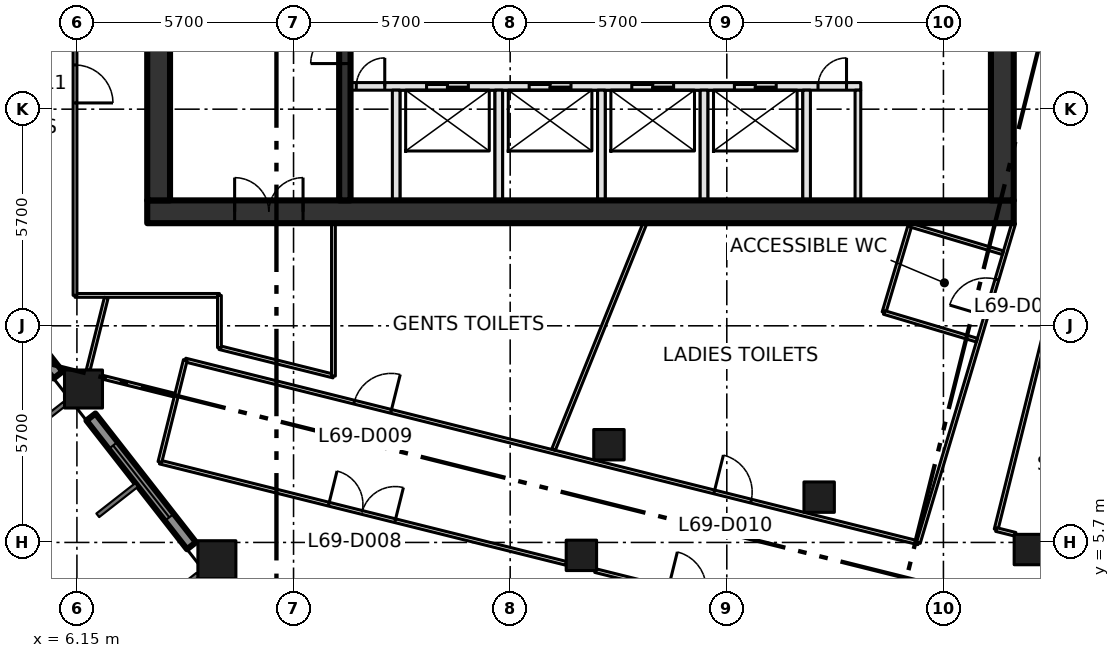
"""IFC4 building model, lengths in metres.
Left out: names, types, materials, properties, quantities, classifications, styles, units other than length and angle.
Written with IfcOpenShell. Run it as: python <this file> out.ifc"""

import sys

from ifc_helpers import new_model, si_unit, direction, frame, frame_2d, origin, origin_2d, place, context, subcontext, project, spatial, rectangle, extrude, element, fill, save


model = new_model("IFC4")
c1 = context("Model", 3, precision=1e-05, world=origin(), true_north=direction((0.0, 1.0)))
c2 = subcontext(c1, "Body", "Model", "MODEL_VIEW")
j1 = project(units=[si_unit("LENGTHUNIT", "METRE"), si_unit("PLANEANGLEUNIT", "RADIAN")], contexts=[c1])
p1 = place(None, origin())
s1 = spatial("IfcSite", under=j1, at=p1, CompositionType="ELEMENT")
p2 = place(p1, origin())
s2 = spatial("IfcBuilding", under=s1, at=p2, CompositionType="ELEMENT")
p3 = place(p2, frame((0.0, 0.0, 302.4)))
s3 = spatial("IfcBuildingStorey", under=s2, at=p3, CompositionType="ELEMENT", Elevation=302.4)
for number, where, z_axis, x_axis in (
    (1, (9.833, 5.245, 0.0), (0.0, 0.0, 1.0), (1.0, 0.0, 0.0)),
    (2, (6.323, 9.737, 0.0), (0.0, 0.0, 1.0), (1.0, 0.0, 0.0)),
):
    element("IfcColumn", number, at=place(p3, frame(where, z_axis=z_axis, x_axis=x_axis)), inside=s3, PredefinedType="COLUMN", context=c2, shape_type="SweptSolid", body=[
        extrude(rectangle(XDim=1.0, YDim=1.0, at=origin_2d()), origin(), (0.0, 0.0, 1.0), 4.2),
    ])
for number, where, z_axis, x_axis in (
    (3, (19.424, 5.36, 0.0), (0.0, 0.0, 1.0), (1.0, 0.0, 0.0)),
    (4, (20.149, 8.271, 0.0), (0.0, 0.0, 1.0), (1.0, 0.0, 0.0)),
    (5, (25.68, 6.892, 0.0), (0.0, 0.0, 1.0), (1.0, 0.0, 0.0)),
    (6, (31.211, 5.513, 0.0), (0.0, 0.0, 1.0), (1.0, 0.0, 0.0)),
):
    element("IfcColumn", number, at=place(p3, frame(where, z_axis=z_axis, x_axis=x_axis)), inside=s3, PredefinedType="COLUMN", context=c2, shape_type="SweptSolid", body=[
        extrude(rectangle(XDim=0.8, YDim=0.8, at=origin_2d()), origin(), (0.0, 0.0, 1.0), 4.2),
    ])
p4 = place(p3, frame((8.0, 14.4, -0.3), z_axis=(0.0, 0.0, 1.0), x_axis=(1.0, 0.0, 0.0)))
e7 = element("IfcWall", 7, at=p4, inside=s3, PredefinedType="SHEAR", context=c2, shape_type="SweptSolid", body=[
    extrude(rectangle(XDim=22.8, YDim=0.6, at=frame_2d((11.4, 0.0))), origin(), (0.0, 0.0, 1.0), 4.2),
])
p5 = place(p4, frame((2.3, 0.0, 0.3)))
e8 = element("IfcOpeningElement", 8, at=p5, cuts=e7, PredefinedType="OPENING", context=c2, shape_type="SweptSolid", body=[
    extrude(rectangle(XDim=1.8, YDim=2.1, at=frame_2d((0.9, 1.05))), frame((0.0, 0.31, 0.0), z_axis=(0.0, -1.0, 0.0), x_axis=(1.0, 0.0, 0.0)), (0.0, 0.0, 1.0), 0.62),
])
for number, where, z_axis, x_axis in (
    (9, (8.3, 14.7, -0.3), (0.0, 0.0, 1.0), (0.0, 1.0, 0.0)),
    (10, (30.5, 14.7, -0.3), (0.0, 0.0, 1.0), (0.0, 1.0, 0.0)),
):
    element("IfcWall", number, at=place(p3, frame(where, z_axis=z_axis, x_axis=x_axis)), inside=s3, PredefinedType="SHEAR", context=c2, shape_type="SweptSolid", body=[
        extrude(rectangle(XDim=21.0, YDim=0.6, at=frame_2d((10.5, 0.0))), origin(), (0.0, 0.0, 1.0), 4.2),
    ])
p6 = place(p3, frame((13.35, 17.7, 0.0), z_axis=(0.0, 0.0, 1.0), x_axis=(1.0, 0.0, 0.0)))
e11 = element("IfcWall", 11, at=p6, inside=s3, PredefinedType="SOLIDWALL", context=c2, shape_type="SweptSolid", body=[
    extrude(rectangle(XDim=13.425, YDim=0.2, at=frame_2d((6.712, 0.0))), origin(), (0.0, 0.0, 1.0), 3.9),
])
p7 = place(p6, frame((2.0, 0.0, 0.0)))
e12 = element("IfcOpeningElement", 12, at=p7, cuts=e11, PredefinedType="OPENING", context=c2, shape_type="SweptSolid", body=[
    extrude(rectangle(XDim=1.1, YDim=2.1, at=frame_2d((0.55, 1.05))), frame((0.0, 0.11, 0.0), z_axis=(0.0, -1.0, 0.0), x_axis=(1.0, 0.0, 0.0)), (0.0, 0.0, 1.0), 0.22),
])
p8 = place(p6, frame((4.7, 0.0, 0.0)))
e13 = element("IfcOpeningElement", 13, at=p8, cuts=e11, PredefinedType="OPENING", context=c2, shape_type="SweptSolid", body=[
    extrude(rectangle(XDim=1.1, YDim=2.1, at=frame_2d((0.55, 1.05))), frame((0.0, 0.11, 0.0), z_axis=(0.0, -1.0, 0.0), x_axis=(1.0, 0.0, 0.0)), (0.0, 0.0, 1.0), 0.22),
])
p9 = place(p6, frame((7.4, 0.0, 0.0)))
e14 = element("IfcOpeningElement", 14, at=p9, cuts=e11, PredefinedType="OPENING", context=c2, shape_type="SweptSolid", body=[
    extrude(rectangle(XDim=1.1, YDim=2.1, at=frame_2d((0.55, 1.05))), frame((0.0, 0.11, 0.0), z_axis=(0.0, -1.0, 0.0), x_axis=(1.0, 0.0, 0.0)), (0.0, 0.0, 1.0), 0.22),
])
p10 = place(p6, frame((10.1, 0.0, 0.0)))
e15 = element("IfcOpeningElement", 15, at=p10, cuts=e11, PredefinedType="OPENING", context=c2, shape_type="SweptSolid", body=[
    extrude(rectangle(XDim=1.1, YDim=2.1, at=frame_2d((0.55, 1.05))), frame((0.0, 0.11, 0.0), z_axis=(0.0, -1.0, 0.0), x_axis=(1.0, 0.0, 0.0)), (0.0, 0.0, 1.0), 0.22),
])
p11 = place(p6, frame((0.15, 0.0, 0.0)))
e16 = element("IfcOpeningElement", 16, at=p11, cuts=e11, PredefinedType="OPENING", context=c2, shape_type="SweptSolid", body=[
    extrude(rectangle(XDim=0.75, YDim=2.1, at=frame_2d((0.375, 1.05))), frame((0.0, 0.11, 0.0), z_axis=(0.0, -1.0, 0.0), x_axis=(1.0, 0.0, 0.0)), (0.0, 0.0, 1.0), 0.22),
])
p12 = place(p6, frame((12.3, 0.0, 0.0)))
e17 = element("IfcOpeningElement", 17, at=p12, cuts=e11, PredefinedType="OPENING", context=c2, shape_type="SweptSolid", body=[
    extrude(rectangle(XDim=0.75, YDim=2.1, at=frame_2d((0.375, 1.05))), frame((0.0, 0.11, 0.0), z_axis=(0.0, -1.0, 0.0), x_axis=(1.0, 0.0, 0.0)), (0.0, 0.0, 1.0), 0.22),
])
p13 = place(p3, frame((13.2, 14.7, 0.0), z_axis=(0.0, 0.0, 1.0), x_axis=(0.0, 1.0, 0.0)))
e18 = element("IfcWall", 18, at=p13, inside=s3, PredefinedType="SHEAR", context=c2, shape_type="SweptSolid", body=[
    extrude(rectangle(XDim=21.0, YDim=0.3, at=frame_2d((10.5, 0.0))), origin(), (0.0, 0.0, 1.0), 3.9),
])
p14 = place(p13, frame((3.6, 0.0, 0.0)))
e19 = element("IfcOpeningElement", 19, at=p14, cuts=e18, PredefinedType="OPENING", context=c2, shape_type="SweptSolid", body=[
    extrude(rectangle(XDim=1.8, YDim=2.1, at=frame_2d((0.9, 1.05))), frame((0.0, 0.16, 0.0), z_axis=(0.0, -1.0, 0.0), x_axis=(1.0, 0.0, 0.0)), (0.0, 0.0, 1.0), 0.32),
])
p15 = place(p13, frame((11.7, 0.0, 0.0)))
e20 = element("IfcOpeningElement", 20, at=p15, cuts=e18, PredefinedType="OPENING", context=c2, shape_type="SweptSolid", body=[
    extrude(rectangle(XDim=1.2, YDim=2.1, at=frame_2d((0.6, 1.05))), frame((0.0, 0.16, 0.0), z_axis=(0.0, -1.0, 0.0), x_axis=(1.0, 0.0, 0.0)), (0.0, 0.0, 1.0), 0.32),
])
for number, where, z_axis, x_axis in (
    (21, (14.55, 14.7, 0.0), (0.0, 0.0, 1.0), (0.0, 1.0, 0.0)),
    (22, (17.25, 14.7, 0.0), (0.0, 0.0, 1.0), (0.0, 1.0, 0.0)),
    (23, (19.95, 14.7, 0.0), (0.0, 0.0, 1.0), (0.0, 1.0, 0.0)),
    (24, (22.65, 14.7, 0.0), (0.0, 0.0, 1.0), (0.0, 1.0, 0.0)),
    (25, (25.35, 14.7, 0.0), (0.0, 0.0, 1.0), (0.0, 1.0, 0.0)),
):
    element("IfcWall", number, at=place(p3, frame(where, z_axis=z_axis, x_axis=x_axis)), inside=s3, PredefinedType="SOLIDWALL", context=c2, shape_type="SweptSolid", body=[
        extrude(rectangle(XDim=2.9, YDim=0.2, at=frame_2d((1.45, 0.0))), origin(), (0.0, 0.0, 1.0), 3.9),
    ])
p16 = place(p3, frame((26.7, 14.7, 0.0), z_axis=(0.0, 0.0, 1.0), x_axis=(0.0, 1.0, 0.0)))
e26 = element("IfcWall", 26, at=p16, inside=s3, PredefinedType="PARTITIONING", context=c2, shape_type="SweptSolid", body=[
    extrude(rectangle(XDim=2.9, YDim=0.15, at=frame_2d((1.45, 0.0))), origin(), (0.0, 0.0, 1.0), 3.9),
])
p17 = place(p3, frame((3.01, 13.491, 0.0), z_axis=(0.0, 0.0, 1.0), x_axis=(0.615713519567, -0.787970089421, 0.0)))
e27 = element("IfcWall", 27, at=p17, inside=s3, PredefinedType="SOLIDWALL", context=c2, shape_type="SweptSolid", body=[
    extrude(rectangle(XDim=4.296, YDim=0.3, at=frame_2d((2.148, 0.0))), origin(), (0.0, 0.0, 1.0), 3.2),
])
p18 = place(p17, frame((0.948, 0.0, 0.8)))
e28 = element("IfcOpeningElement", 28, at=p18, cuts=e27, PredefinedType="OPENING", context=c2, shape_type="SweptSolid", body=[
    extrude(rectangle(XDim=2.4, YDim=2.1, at=frame_2d((1.2, 1.05))), frame((0.0, 0.16, 0.0), z_axis=(0.0, -1.0, 0.0), x_axis=(1.0, 0.0, 0.0)), (0.0, 0.0, 1.0), 0.32),
])
p19 = place(p3, frame((6.519, 9.0, 0.0), z_axis=(0.0, 0.0, 1.0), x_axis=(0.615634121154, -0.788032124263, 0.0)))
e29 = element("IfcWall", 29, at=p19, inside=s3, PredefinedType="SOLIDWALL", context=c2, shape_type="SweptSolid", body=[
    extrude(rectangle(XDim=4.298, YDim=0.3, at=frame_2d((2.149, 0.0))), origin(), (0.0, 0.0, 1.0), 3.2),
])
p20 = place(p19, frame((0.949, 0.0, 0.8)))
e30 = element("IfcOpeningElement", 30, at=p20, cuts=e29, PredefinedType="OPENING", context=c2, shape_type="SweptSolid", body=[
    extrude(rectangle(XDim=2.4, YDim=2.1, at=frame_2d((1.2, 1.05))), frame((0.0, 0.16, 0.0), z_axis=(0.0, -1.0, 0.0), x_axis=(1.0, 0.0, 0.0)), (0.0, 0.0, 1.0), 0.32),
])
p21 = place(p3, frame((6.1, 12.2, 0.0), z_axis=(0.0, 0.0, 1.0), x_axis=(1.0, 0.0, 0.0)))
e31 = element("IfcWall", 31, at=p21, inside=s3, PredefinedType="PARTITIONING", context=c2, shape_type="SweptSolid", body=[
    extrude(rectangle(XDim=3.8, YDim=0.1, at=frame_2d((1.9, 0.0))), origin(), (0.0, 0.0, 1.0), 3.9),
])
p22 = place(p3, frame((6.1, 38.9, 0.0), z_axis=(0.0, 0.0, 1.0), x_axis=(0.0, -1.0, 0.0)))
e32 = element("IfcWall", 32, at=p22, inside=s3, PredefinedType="PARTITIONING", context=c2, shape_type="SweptSolid", body=[
    extrude(rectangle(XDim=26.7, YDim=0.1, at=frame_2d((13.35, 0.0))), origin(), (0.0, 0.0, 1.0), 3.9),
])
p23 = place(p22, frame((20.636, 0.0, 0.0)))
e33 = element("IfcOpeningElement", 33, at=p23, cuts=e32, PredefinedType="OPENING", context=c2, shape_type="SweptSolid", body=[
    extrude(rectangle(XDim=1.0, YDim=2.1, at=frame_2d((0.5, 1.05))), frame((0.0, 0.06, 0.0), z_axis=(0.0, -1.0, 0.0), x_axis=(1.0, 0.0, 0.0)), (0.0, 0.0, 1.0), 0.12),
])
p24 = place(p22, frame((6.88, 0.0, 0.0)))
e34 = element("IfcOpeningElement", 34, at=p24, cuts=e32, PredefinedType="OPENING", context=c2, shape_type="SweptSolid", body=[
    extrude(rectangle(XDim=1.8, YDim=2.1, at=frame_2d((0.9, 1.05))), frame((0.0, 0.06, 0.0), z_axis=(0.0, -1.0, 0.0), x_axis=(1.0, 0.0, 0.0)), (0.0, 0.0, 1.0), 0.12),
])
p25 = place(p3, frame((8.333, 7.815, 0.0), z_axis=(0.0, 0.0, 1.0), x_axis=(0.970306508913, -0.241878644697, 0.0)))
e35 = element("IfcWall", 35, at=p25, inside=s3, PredefinedType="PARTITIONING", context=c2, shape_type="SweptSolid", body=[
    extrude(rectangle(XDim=11.018, YDim=0.1, at=frame_2d((5.509, 0.0))), origin(), (0.0, 0.0, 1.0), 3.9),
])
p26 = place(p25, frame((4.58, 0.0, 0.0)))
e36 = element("IfcOpeningElement", 36, at=p26, cuts=e35, PredefinedType="OPENING", context=c2, shape_type="SweptSolid", body=[
    extrude(rectangle(XDim=1.8, YDim=2.1, at=frame_2d((0.9, 1.05))), frame((0.0, 0.06, 0.0), z_axis=(0.0, -1.0, 0.0), x_axis=(1.0, 0.0, 0.0)), (0.0, 0.0, 1.0), 0.12),
])
p27 = place(p3, frame((9.002, 10.499, 0.0), z_axis=(0.0, 0.0, 1.0), x_axis=(0.970298340477, -0.241911410372, 0.0)))
e37 = element("IfcWall", 37, at=p27, inside=s3, PredefinedType="PARTITIONING", context=c2, shape_type="SweptSolid", body=[
    extrude(rectangle(XDim=19.88, YDim=0.1, at=frame_2d((9.94, 0.0))), origin(), (0.0, 0.0, 1.0), 3.9),
])
p28 = place(p27, frame((4.58, 0.0, 0.0)))
e38 = element("IfcOpeningElement", 38, at=p28, cuts=e37, PredefinedType="OPENING", context=c2, shape_type="SweptSolid", body=[
    extrude(rectangle(XDim=1.0, YDim=2.1, at=frame_2d((0.5, 1.05))), frame((0.0, 0.06, 0.0), z_axis=(0.0, -1.0, 0.0), x_axis=(1.0, 0.0, 0.0)), (0.0, 0.0, 1.0), 0.12),
])
p29 = place(p27, frame((14.343, 0.0, 0.0)))
e39 = element("IfcOpeningElement", 39, at=p29, cuts=e37, PredefinedType="OPENING", context=c2, shape_type="SweptSolid", body=[
    extrude(rectangle(XDim=1.0, YDim=2.1, at=frame_2d((0.5, 1.05))), frame((0.0, 0.06, 0.0), z_axis=(0.0, -1.0, 0.0), x_axis=(1.0, 0.0, 0.0)), (0.0, 0.0, 1.0), 0.12),
])
p30 = place(p3, frame((9.002, 10.499, 0.0), z_axis=(0.0, 0.0, 1.0), x_axis=(-0.2418294893, -0.970318761081, 0.0)))
e40 = element("IfcWall", 40, at=p30, inside=s3, PredefinedType="PARTITIONING", context=c2, shape_type="SweptSolid", body=[
    extrude(rectangle(XDim=2.766, YDim=0.1, at=frame_2d((1.383, 0.0))), origin(), (0.0, 0.0, 1.0), 3.9),
])
p31 = place(p3, frame((9.9, 10.826, 0.0), z_axis=(0.0, 0.0, 1.0), x_axis=(0.970290953223, -0.241941038466, 0.0)))
e41 = element("IfcWall", 41, at=p31, inside=s3, PredefinedType="PARTITIONING", context=c2, shape_type="SweptSolid", body=[
    extrude(rectangle(XDim=3.092, YDim=0.1, at=frame_2d((1.546, 0.0))), origin(), (0.0, 0.0, 1.0), 3.9),
])
p32 = place(p3, frame((9.9, 12.2, 0.0), z_axis=(0.0, 0.0, 1.0), x_axis=(0.0, -1.0, 0.0)))
e42 = element("IfcWall", 42, at=p32, inside=s3, PredefinedType="PARTITIONING", context=c2, shape_type="SweptSolid", body=[
    extrude(rectangle(XDim=1.374, YDim=0.1, at=frame_2d((0.687, 0.0))), origin(), (0.0, 0.0, 1.0), 3.9),
])
p33 = place(p3, frame((12.9, 10.078, 0.0), z_axis=(0.0, 0.0, 1.0), x_axis=(0.0, 1.0, 0.0)))
e43 = element("IfcWall", 43, at=p33, inside=s3, PredefinedType="PARTITIONING", context=c2, shape_type="SweptSolid", body=[
    extrude(rectangle(XDim=4.022, YDim=0.1, at=frame_2d((2.011, 0.0))), origin(), (0.0, 0.0, 1.0), 3.9),
])
p34 = place(p3, frame((19.786, 4.96, 0.0), z_axis=(0.0, 0.0, 1.0), x_axis=(0.970335085454, -0.241763979817, 0.0)))
e44 = element("IfcWall", 44, at=p34, inside=s3, PredefinedType="PARTITIONING", context=c2, shape_type="SweptSolid", body=[
    extrude(rectangle(XDim=4.914, YDim=0.1, at=frame_2d((2.457, 0.0))), origin(), (0.0, 0.0, 1.0), 3.9),
])
p35 = place(p34, frame((1.98, 0.0, 0.0)))
e45 = element("IfcOpeningElement", 45, at=p35, cuts=e44, PredefinedType="OPENING", context=c2, shape_type="SweptSolid", body=[
    extrude(rectangle(XDim=1.0, YDim=2.1, at=frame_2d((0.5, 1.05))), frame((0.0, 0.06, 0.0), z_axis=(0.0, -1.0, 0.0), x_axis=(1.0, 0.0, 0.0)), (0.0, 0.0, 1.0), 0.12),
])
p36 = place(p3, frame((28.291, 5.69, 0.0), z_axis=(0.0, 0.0, 1.0), x_axis=(0.28588265334, 0.958264633867, 0.0)))
e46 = element("IfcWall", 46, at=p36, inside=s3, PredefinedType="PARTITIONING", context=c2, shape_type="SweptSolid", body=[
    extrude(rectangle(XDim=8.776, YDim=0.1, at=frame_2d((4.388, 0.0))), origin(), (0.0, 0.0, 1.0), 3.9),
])
p37 = place(p36, frame((6.23, 0.0, 0.0)))
e47 = element("IfcOpeningElement", 47, at=p37, cuts=e46, PredefinedType="OPENING", context=c2, shape_type="SweptSolid", body=[
    extrude(rectangle(XDim=1.0, YDim=2.1, at=frame_2d((0.5, 1.05))), frame((0.0, 0.06, 0.0), z_axis=(0.0, -1.0, 0.0), x_axis=(1.0, 0.0, 0.0)), (0.0, 0.0, 1.0), 0.12),
])
p38 = place(p3, frame((30.336, 6.04, 0.0), z_axis=(0.0, 0.0, 1.0), x_axis=(0.2420145387, 0.970272623059, 0.0)))
e48 = element("IfcWall", 48, at=p38, inside=s3, PredefinedType="PARTITIONING", context=c2, shape_type="SweptSolid", body=[
    extrude(rectangle(XDim=7.276, YDim=0.1, at=frame_2d((3.638, 0.0))), origin(), (0.0, 0.0, 1.0), 3.9),
])
p39 = place(p3, frame((30.845, 5.913, 0.0), z_axis=(0.0, 0.0, 1.0), x_axis=(-0.970279216762, 0.241988102022, 0.0)))
e49 = element("IfcWall", 49, at=p39, inside=s3, PredefinedType="PARTITIONING", context=c2, shape_type="SweptSolid", body=[
    extrude(rectangle(XDim=0.525, YDim=0.1, at=frame_2d((0.262, 0.0))), origin(), (0.0, 0.0, 1.0), 3.9),
])
p40 = place(p3, frame((6.922, 12.138, 0.0), z_axis=(0.0, 0.0, 1.0), x_axis=(-0.242476987996, -0.970157157523, 0.0)))
e50 = element("IfcWall", 50, at=p40, inside=s3, PredefinedType="PARTITIONING", context=c2, shape_type="SweptSolid", body=[
    extrude(rectangle(XDim=1.959, YDim=0.1, at=frame_2d((0.98, 0.0))), origin(), (0.0, 0.0, 1.0), 3.9),
])
p41 = place(p3, frame((8.72, 9.575, 0.0), z_axis=(0.0, 0.0, 1.0), x_axis=(-0.970274576003, 0.242006708918, 0.0)))
e51 = element("IfcWall", 51, at=p41, inside=s3, PredefinedType="PARTITIONING", context=c2, shape_type="SweptSolid", body=[
    extrude(rectangle(XDim=1.955, YDim=0.1, at=frame_2d((0.978, 0.0))), origin(), (0.0, 0.0, 1.0), 3.9),
])
p42 = place(p3, frame((18.691, 8.142, 0.0), z_axis=(0.0, 0.0, 1.0), x_axis=(0.374447972071, 0.927247925968, 0.0)))
e52 = element("IfcWall", 52, at=p42, inside=s3, PredefinedType="PARTITIONING", context=c2, shape_type="SweptSolid", body=[
    extrude(rectangle(XDim=6.426, YDim=0.1, at=frame_2d((3.213, 0.0))), origin(), (0.0, 0.0, 1.0), 3.9),
])
p43 = place(p3, frame((27.386, 11.752, 0.0), z_axis=(0.0, 0.0, 1.0), x_axis=(0.285826425332, 0.958281406781, 0.0)))
e53 = element("IfcWall", 53, at=p43, inside=s3, PredefinedType="PARTITIONING", context=c2, shape_type="SweptSolid", body=[
    extrude(rectangle(XDim=2.4, YDim=0.1, at=frame_2d((1.2, 0.0))), origin(), (0.0, 0.0, 1.0), 3.9),
])
for number, where, z_axis, x_axis in (
    (54, (28.072, 14.052, 0.0), (0.0, 0.0, 1.0), (0.958, -0.286, 0.0)),
    (55, (29.83, 11.023, 0.0), (0.0, 0.0, 1.0), (-0.958, 0.286, 0.0)),
):
    element("IfcWall", number, at=place(p3, frame(where, z_axis=z_axis, x_axis=x_axis)), inside=s3, PredefinedType="PARTITIONING", context=c2, shape_type="SweptSolid", body=[
        extrude(rectangle(XDim=2.551, YDim=0.1, at=frame_2d((1.275, 0.0))), origin(), (0.0, 0.0, 1.0), 3.9),
    ])
p44 = place(p7, origin())
e56 = element("IfcDoor", 56, at=p44, inside=s3, OperationType="SLIDING_TO_LEFT", PredefinedType="DOOR", context=c2, shape_type="SweptSolid", body=[
    extrude(rectangle(XDim=1.1, YDim=2.1, at=frame_2d((0.55, 1.05))), frame((0.0, 0.025, 0.0), z_axis=(0.0, -1.0, 0.0), x_axis=(1.0, 0.0, 0.0)), (0.0, 0.0, 1.0), 0.05),
])
fill(e12, e56)
p45 = place(p8, origin())
e57 = element("IfcDoor", 57, at=p45, inside=s3, OperationType="SLIDING_TO_LEFT", PredefinedType="DOOR", context=c2, shape_type="SweptSolid", body=[
    extrude(rectangle(XDim=1.1, YDim=2.1, at=frame_2d((0.55, 1.05))), frame((0.0, 0.025, 0.0), z_axis=(0.0, -1.0, 0.0), x_axis=(1.0, 0.0, 0.0)), (0.0, 0.0, 1.0), 0.05),
])
fill(e13, e57)
p46 = place(p9, origin())
e58 = element("IfcDoor", 58, at=p46, inside=s3, OperationType="SLIDING_TO_LEFT", PredefinedType="DOOR", context=c2, shape_type="SweptSolid", body=[
    extrude(rectangle(XDim=1.1, YDim=2.1, at=frame_2d((0.55, 1.05))), frame((0.0, 0.025, 0.0), z_axis=(0.0, -1.0, 0.0), x_axis=(1.0, 0.0, 0.0)), (0.0, 0.0, 1.0), 0.05),
])
fill(e14, e58)
p47 = place(p10, origin())
e59 = element("IfcDoor", 59, at=p47, inside=s3, OperationType="SLIDING_TO_LEFT", PredefinedType="DOOR", context=c2, shape_type="SweptSolid", body=[
    extrude(rectangle(XDim=1.1, YDim=2.1, at=frame_2d((0.55, 1.05))), frame((0.0, 0.025, 0.0), z_axis=(0.0, -1.0, 0.0), x_axis=(1.0, 0.0, 0.0)), (0.0, 0.0, 1.0), 0.05),
])
fill(e15, e59)
p48 = place(p11, origin())
e60 = element("IfcDoor", 60, at=p48, inside=s3, OperationType="SINGLE_SWING_RIGHT", PredefinedType="DOOR", context=c2, shape_type="SweptSolid", body=[
    extrude(rectangle(XDim=0.75, YDim=2.1, at=frame_2d((0.375, 1.05))), frame((0.0, 0.025, 0.0), z_axis=(0.0, -1.0, 0.0), x_axis=(1.0, 0.0, 0.0)), (0.0, 0.0, 1.0), 0.05),
])
fill(e16, e60)
p49 = place(p12, origin())
e61 = element("IfcDoor", 61, at=p49, inside=s3, OperationType="SINGLE_SWING_RIGHT", PredefinedType="DOOR", context=c2, shape_type="SweptSolid", body=[
    extrude(rectangle(XDim=0.75, YDim=2.1, at=frame_2d((0.375, 1.05))), frame((0.0, 0.025, 0.0), z_axis=(0.0, -1.0, 0.0), x_axis=(1.0, 0.0, 0.0)), (0.0, 0.0, 1.0), 0.05),
])
fill(e17, e61)
p50 = place(p14, origin())
e62 = element("IfcDoor", 62, at=p50, inside=s3, OperationType="DOUBLE_DOOR_SINGLE_SWING", PredefinedType="DOOR", context=c2, shape_type="SweptSolid", body=[
    extrude(rectangle(XDim=1.8, YDim=2.1, at=frame_2d((0.9, 1.05))), frame((0.0, 0.025, 0.0), z_axis=(0.0, -1.0, 0.0), x_axis=(1.0, 0.0, 0.0)), (0.0, 0.0, 1.0), 0.05),
])
fill(e19, e62)
p51 = place(p5, origin())
e63 = element("IfcDoor", 63, at=p51, inside=s3, OperationType="DOUBLE_DOOR_SINGLE_SWING", PredefinedType="DOOR", context=c2, shape_type="SweptSolid", body=[
    extrude(rectangle(XDim=1.8, YDim=2.1, at=frame_2d((0.9, 1.05))), frame((0.0, 0.025, 0.0), z_axis=(0.0, -1.0, 0.0), x_axis=(1.0, 0.0, 0.0)), (0.0, 0.0, 1.0), 0.05),
])
fill(e8, e63)
p52 = place(p20, origin())
e64 = element("IfcWindow", 64, at=p52, inside=s3, PartitioningType="DOUBLE_PANEL_VERTICAL", PredefinedType="WINDOW", context=c2, shape_type="SweptSolid", body=[
    extrude(rectangle(XDim=2.4, YDim=2.1, at=frame_2d((1.2, 1.05))), frame((0.0, 0.03, 0.0), z_axis=(0.0, -1.0, 0.0), x_axis=(1.0, 0.0, 0.0)), (0.0, 0.0, 1.0), 0.06),
])
fill(e30, e64)
p53 = place(p26, origin())
e65 = element("IfcDoor", 65, at=p53, inside=s3, OperationType="DOUBLE_DOOR_SINGLE_SWING", PredefinedType="DOOR", context=c2, shape_type="SweptSolid", body=[
    extrude(rectangle(XDim=1.8, YDim=2.1, at=frame_2d((0.9, 1.05))), frame((0.0, 0.025, 0.0), z_axis=(0.0, -1.0, 0.0), x_axis=(1.0, 0.0, 0.0)), (0.0, 0.0, 1.0), 0.05),
])
fill(e36, e65)
p54 = place(p28, origin())
e66 = element("IfcDoor", 66, at=p54, inside=s3, OperationType="SINGLE_SWING_RIGHT", PredefinedType="DOOR", context=c2, shape_type="SweptSolid", body=[
    extrude(rectangle(XDim=1.0, YDim=2.1, at=frame_2d((0.5, 1.05))), frame((0.0, 0.025, 0.0), z_axis=(0.0, -1.0, 0.0), x_axis=(1.0, 0.0, 0.0)), (0.0, 0.0, 1.0), 0.05),
])
fill(e38, e66)
p55 = place(p29, origin())
e67 = element("IfcDoor", 67, at=p55, inside=s3, OperationType="SINGLE_SWING_LEFT", PredefinedType="DOOR", context=c2, shape_type="SweptSolid", body=[
    extrude(rectangle(XDim=1.0, YDim=2.1, at=frame_2d((0.5, 1.05))), frame((0.0, 0.025, 0.0), z_axis=(0.0, -1.0, 0.0), x_axis=(1.0, 0.0, 0.0)), (0.0, 0.0, 1.0), 0.05),
])
fill(e39, e67)
p56 = place(p23, origin())
e68 = element("IfcDoor", 68, at=p56, inside=s3, OperationType="SINGLE_SWING_RIGHT", PredefinedType="DOOR", context=c2, shape_type="SweptSolid", body=[
    extrude(rectangle(XDim=1.0, YDim=2.1, at=frame_2d((0.5, 1.05))), frame((0.0, 0.025, 0.0), z_axis=(0.0, -1.0, 0.0), x_axis=(1.0, 0.0, 0.0)), (0.0, 0.0, 1.0), 0.05),
])
fill(e33, e68)
p57 = place(p37, origin())
e69 = element("IfcDoor", 69, at=p57, inside=s3, OperationType="SINGLE_SWING_LEFT", PredefinedType="DOOR", context=c2, shape_type="SweptSolid", body=[
    extrude(rectangle(XDim=1.0, YDim=2.1, at=frame_2d((0.5, 1.05))), frame((0.0, 0.025, 0.0), z_axis=(0.0, -1.0, 0.0), x_axis=(1.0, 0.0, 0.0)), (0.0, 0.0, 1.0), 0.05),
])
fill(e47, e69)
save(model, sys.argv[1])
